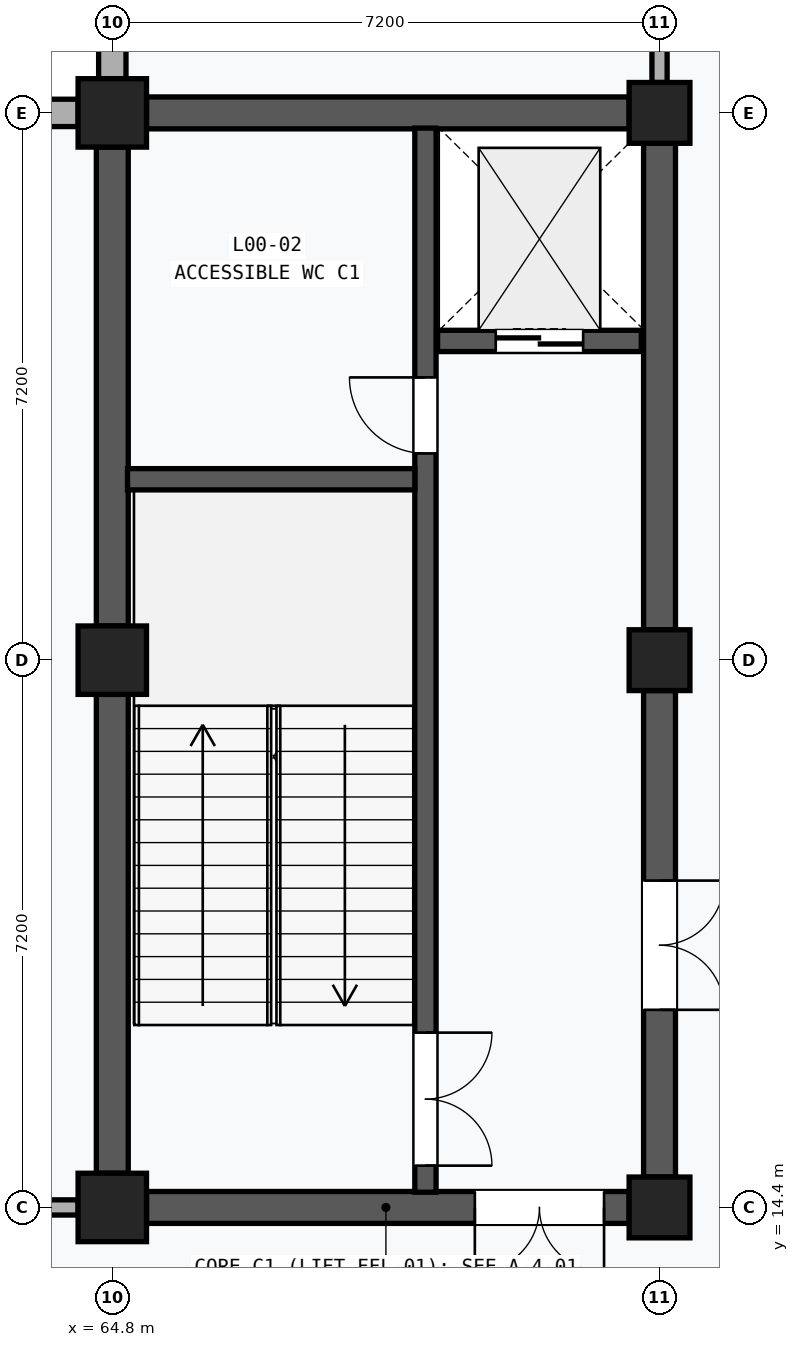
"""IFC4 building model, lengths in metres.
Left out: names, types, materials, properties, quantities, classifications, styles, units other than length and angle.
Written with IfcOpenShell. Run it as: python <this file> out.ifc"""

import sys

from ifc_helpers import new_model, si_unit, direction, frame, frame_2d, origin, origin_2d, place, context, subcontext, project, spatial, rectangle, extrude, element, fill, save


model = new_model("IFC4")
c1 = context("Model", 3, precision=1e-05, world=origin(), true_north=direction((0.0, 1.0)))
c2 = subcontext(c1, "Body", "Model", "MODEL_VIEW")
j1 = project(units=[si_unit("LENGTHUNIT", "METRE"), si_unit("PLANEANGLEUNIT", "RADIAN")], contexts=[c1])
p1 = place(None, origin())
s1 = spatial("IfcSite", under=j1, at=p1, CompositionType="ELEMENT")
p2 = place(p1, origin())
s2 = spatial("IfcBuilding", under=s1, at=p2, CompositionType="ELEMENT")
p3 = place(p2, origin())
s3 = spatial("IfcBuildingStorey", under=s2, at=p3, CompositionType="ELEMENT", Elevation=0.0)
for number, where, z_axis, x_axis in (
    (1, (64.8, 14.4, 0.0), (0.0, 0.0, 1.0), (1.0, 0.0, 0.0)),
    (2, (64.8, 21.6, 0.0), (0.0, 0.0, 1.0), (1.0, 0.0, 0.0)),
    (3, (64.8, 28.8, 0.0), (0.0, 0.0, 1.0), (1.0, 0.0, 0.0)),
):
    element("IfcColumn", number, at=place(p3, frame(where, z_axis=z_axis, x_axis=x_axis)), inside=s3, PredefinedType="COLUMN", context=c2, shape_type="SweptSolid", body=[
        extrude(rectangle(XDim=0.9, YDim=0.9, at=origin_2d()), origin(), (0.0, 0.0, 1.0), 4.8),
    ])
for number, where, z_axis, x_axis in (
    (4, (72.0, 14.4, 0.0), (0.0, 0.0, 1.0), (1.0, 0.0, 0.0)),
    (5, (72.0, 21.6, 0.0), (0.0, 0.0, 1.0), (1.0, 0.0, 0.0)),
    (6, (72.0, 28.8, 0.0), (0.0, 0.0, 1.0), (1.0, 0.0, 0.0)),
):
    element("IfcColumn", number, at=place(p3, frame(where, z_axis=z_axis, x_axis=x_axis)), inside=s3, PredefinedType="COLUMN", context=c2, shape_type="SweptSolid", body=[
        extrude(rectangle(XDim=0.8, YDim=0.8, at=origin_2d()), origin(), (0.0, 0.0, 1.0), 4.8),
    ])
p4 = place(p3, frame((58.0, 28.8, 0.0), z_axis=(0.0, 0.0, 1.0), x_axis=(1.0, 0.0, 0.0)))
e7 = element("IfcWall", 7, at=p4, inside=s3, PredefinedType="SOLIDWALL", context=c2, shape_type="SweptSolid", body=[
    extrude(rectangle(XDim=6.35, YDim=0.36, at=frame_2d((3.175, 0.0))), origin(), (0.0, 0.0, 1.0), 3.89),
])
p5 = place(p4, frame((2.375, 0.0, 1.1)))
e8 = element("IfcOpeningElement", 8, at=p5, cuts=e7, PredefinedType="OPENING", context=c2, shape_type="SweptSolid", body=[
    extrude(rectangle(XDim=1.6, YDim=1.5, at=frame_2d((0.8, 0.75))), frame((0.0, 0.192, 0.0), z_axis=(0.0, -1.0, 0.0), x_axis=(1.0, 0.0, 0.0)), (0.0, 0.0, 1.0), 0.384),
])
p6 = place(p3, frame((64.8, 29.25, 0.0), z_axis=(0.0, 0.0, 1.0), x_axis=(0.0, 1.0, 0.0)))
e9 = element("IfcWall", 9, at=p6, inside=s3, PredefinedType="SOLIDWALL", context=c2, shape_type="SweptSolid", body=[
    extrude(rectangle(XDim=6.3, YDim=0.36, at=frame_2d((3.15, 0.0))), origin(), (0.0, 0.0, 1.0), 3.89),
])
p7 = place(p6, frame((2.2, 0.0, 1.1)))
e10 = element("IfcOpeningElement", 10, at=p7, cuts=e9, PredefinedType="OPENING", context=c2, shape_type="SweptSolid", body=[
    extrude(rectangle(XDim=1.9, YDim=1.5, at=frame_2d((0.95, 0.75))), frame((0.0, 0.192, 0.0), z_axis=(0.0, -1.0, 0.0), x_axis=(1.0, 0.0, 0.0)), (0.0, 0.0, 1.0), 0.384),
])
p8 = place(p3, frame((64.8, 14.85, 0.0), z_axis=(0.0, 0.0, 1.0), x_axis=(0.0, 1.0, 0.0)))
e11 = element("IfcWall", 11, at=p8, inside=s3, PredefinedType="SHEAR", context=c2, shape_type="SweptSolid", body=[
    extrude(rectangle(XDim=6.3, YDim=0.42, at=frame_2d((3.15, 0.0))), origin(), (0.0, 0.0, 1.0), 3.62),
])
p9 = place(p3, frame((64.8, 22.05, 0.0), z_axis=(0.0, 0.0, 1.0), x_axis=(0.0, 1.0, 0.0)))
e12 = element("IfcWall", 12, at=p9, inside=s3, PredefinedType="SHEAR", context=c2, shape_type="SweptSolid", body=[
    extrude(rectangle(XDim=6.3, YDim=0.42, at=frame_2d((3.15, 0.0))), origin(), (0.0, 0.0, 1.0), 3.62),
])
p10 = place(p3, frame((72.0, 14.8, 0.0), z_axis=(0.0, 0.0, 1.0), x_axis=(0.0, 1.0, 0.0)))
e13 = element("IfcWall", 13, at=p10, inside=s3, PredefinedType="SHEAR", context=c2, shape_type="SweptSolid", body=[
    extrude(rectangle(XDim=6.4, YDim=0.42, at=frame_2d((3.2, 0.0))), origin(), (0.0, 0.0, 1.0), 3.62),
])
p11 = place(p10, frame((2.2, 0.0, 0.0)))
e14 = element("IfcOpeningElement", 14, at=p11, cuts=e13, PredefinedType="OPENING", context=c2, shape_type="SweptSolid", body=[
    extrude(rectangle(XDim=1.7, YDim=2.25, at=frame_2d((0.85, 1.125))), frame((0.0, 0.222, 0.0), z_axis=(0.0, -1.0, 0.0), x_axis=(1.0, 0.0, 0.0)), (0.0, 0.0, 1.0), 0.444),
])
p12 = place(p3, frame((72.0, 22.0, 0.0), z_axis=(0.0, 0.0, 1.0), x_axis=(0.0, 1.0, 0.0)))
e15 = element("IfcWall", 15, at=p12, inside=s3, PredefinedType="SHEAR", context=c2, shape_type="SweptSolid", body=[
    extrude(rectangle(XDim=6.4, YDim=0.42, at=frame_2d((3.2, 0.0))), origin(), (0.0, 0.0, 1.0), 3.62),
])
p13 = place(p3, frame((65.25, 14.4, 0.0), z_axis=(0.0, 0.0, 1.0), x_axis=(1.0, 0.0, 0.0)))
e16 = element("IfcWall", 16, at=p13, inside=s3, PredefinedType="SHEAR", context=c2, shape_type="SweptSolid", body=[
    extrude(rectangle(XDim=6.35, YDim=0.42, at=frame_2d((3.175, 0.0))), origin(), (0.0, 0.0, 1.0), 3.62),
])
p14 = place(p13, frame((4.32, 0.0, 0.0)))
e17 = element("IfcOpeningElement", 17, at=p14, cuts=e16, PredefinedType="OPENING", context=c2, shape_type="SweptSolid", body=[
    extrude(rectangle(XDim=1.7, YDim=2.25, at=frame_2d((0.85, 1.125))), frame((0.0, 0.222, 0.0), z_axis=(0.0, -1.0, 0.0), x_axis=(1.0, 0.0, 0.0)), (0.0, 0.0, 1.0), 0.444),
])
p15 = place(p3, frame((65.25, 28.8, 0.0), z_axis=(0.0, 0.0, 1.0), x_axis=(1.0, 0.0, 0.0)))
e18 = element("IfcWall", 18, at=p15, inside=s3, PredefinedType="SHEAR", context=c2, shape_type="SweptSolid", body=[
    extrude(rectangle(XDim=6.35, YDim=0.42, at=frame_2d((3.175, 0.0))), origin(), (0.0, 0.0, 1.0), 3.62),
])
p16 = place(p3, frame((68.92, 14.6, 0.0), z_axis=(0.0, 0.0, 1.0), x_axis=(0.0, 1.0, 0.0)))
e19 = element("IfcWall", 19, at=p16, inside=s3, PredefinedType="SHEAR", context=c2, shape_type="SweptSolid", body=[
    extrude(rectangle(XDim=14.0, YDim=0.28, at=frame_2d((7.0, 0.0))), origin(), (0.0, 0.0, 1.0), 4.52),
])
p17 = place(p16, frame((0.35, 0.0, 0.0)))
e20 = element("IfcOpeningElement", 20, at=p17, cuts=e19, PredefinedType="OPENING", context=c2, shape_type="SweptSolid", body=[
    extrude(rectangle(XDim=1.75, YDim=2.15, at=frame_2d((0.875, 1.075))), frame((0.0, 0.152, 0.0), z_axis=(0.0, -1.0, 0.0), x_axis=(1.0, 0.0, 0.0)), (0.0, 0.0, 1.0), 0.304),
])
p18 = place(p16, frame((9.72, 0.0, 0.0)))
e21 = element("IfcOpeningElement", 21, at=p18, cuts=e19, PredefinedType="OPENING", context=c2, shape_type="SweptSolid", body=[
    extrude(rectangle(XDim=1.0, YDim=2.15, at=frame_2d((0.5, 1.075))), frame((0.0, 0.152, 0.0), z_axis=(0.0, -1.0, 0.0), x_axis=(1.0, 0.0, 0.0)), (0.0, 0.0, 1.0), 0.304),
])
p19 = place(p3, frame((65.0, 23.98, 0.0), z_axis=(0.0, 0.0, 1.0), x_axis=(1.0, 0.0, 0.0)))
e22 = element("IfcWall", 22, at=p19, inside=s3, PredefinedType="SHEAR", context=c2, shape_type="SweptSolid", body=[
    extrude(rectangle(XDim=3.78, YDim=0.28, at=frame_2d((1.89, 0.0))), origin(), (0.0, 0.0, 1.0), 4.52),
])
p20 = place(p3, frame((69.08, 25.8, 0.0), z_axis=(0.0, 0.0, 1.0), x_axis=(1.0, 0.0, 0.0)))
e23 = element("IfcWall", 23, at=p20, inside=s3, PredefinedType="SHEAR", context=c2, shape_type="SweptSolid", body=[
    extrude(rectangle(XDim=2.68, YDim=0.28, at=frame_2d((1.34, 0.0))), origin(), (0.0, 0.0, 1.0), 4.52),
])
p21 = place(p20, frame((0.765, 0.0, 0.0)))
e24 = element("IfcOpeningElement", 24, at=p21, cuts=e23, PredefinedType="OPENING", context=c2, shape_type="SweptSolid", body=[
    extrude(rectangle(XDim=1.15, YDim=2.2, at=frame_2d((0.575, 1.1))), frame((0.0, 0.152, 0.0), z_axis=(0.0, -1.0, 0.0), x_axis=(1.0, 0.0, 0.0)), (0.0, 0.0, 1.0), 0.304),
])
p22 = place(p3, frame((58.0, 14.4, 0.0), z_axis=(0.0, 0.0, 1.0), x_axis=(1.0, 0.0, 0.0)))
e25 = element("IfcWall", 25, at=p22, inside=s3, PredefinedType="PARTITIONING", context=c2, shape_type="SweptSolid", body=[
    extrude(rectangle(XDim=6.35, YDim=0.2, at=frame_2d((3.175, 0.0))), origin(), (0.0, 0.0, 1.0), 3.62),
])
p23 = place(p22, frame((2.675, 0.0, 0.0)))
e26 = element("IfcOpeningElement", 26, at=p23, cuts=e25, PredefinedType="OPENING", context=c2, shape_type="SweptSolid", body=[
    extrude(rectangle(XDim=1.0, YDim=2.1, at=frame_2d((0.5, 1.05))), frame((0.0, 0.112, 0.0), z_axis=(0.0, -1.0, 0.0), x_axis=(1.0, 0.0, 0.0)), (0.0, 0.0, 1.0), 0.224),
])
p24 = place(p3, frame((72.0, 29.2, 0.0), z_axis=(0.0, 0.0, 1.0), x_axis=(0.0, 1.0, 0.0)))
e27 = element("IfcWall", 27, at=p24, inside=s3, PredefinedType="PARTITIONING", context=c2, shape_type="SweptSolid", body=[
    extrude(rectangle(XDim=6.4, YDim=0.2, at=frame_2d((3.2, 0.0))), origin(), (0.0, 0.0, 1.0), 3.62),
])
p25 = place(p24, frame((2.69, 0.0, 0.0)))
e28 = element("IfcOpeningElement", 28, at=p25, cuts=e27, PredefinedType="OPENING", context=c2, shape_type="SweptSolid", body=[
    extrude(rectangle(XDim=1.02, YDim=2.12, at=frame_2d((0.51, 1.06))), frame((0.0, 0.112, 0.0), z_axis=(0.0, -1.0, 0.0), x_axis=(1.0, 0.0, 0.0)), (0.0, 0.0, 1.0), 0.224),
])
p26 = place(p11, frame((1.7, 0.0, 0.0), z_axis=(0.0, 0.0, 1.0), x_axis=(-1.0, 0.0, 0.0)))
e29 = element("IfcDoor", 29, at=p26, inside=s3, OperationType="DOUBLE_DOOR_SINGLE_SWING", PredefinedType="DOOR", context=c2, shape_type="SweptSolid", body=[
    extrude(rectangle(XDim=1.7, YDim=2.25, at=frame_2d((0.85, 1.125))), frame((0.0, 0.025, 0.0), z_axis=(0.0, -1.0, 0.0), x_axis=(1.0, 0.0, 0.0)), (0.0, 0.0, 1.0), 0.05),
])
fill(e14, e29)
p27 = place(p14, frame((1.7, 0.0, 0.0), z_axis=(0.0, 0.0, 1.0), x_axis=(-1.0, 0.0, 0.0)))
e30 = element("IfcDoor", 30, at=p27, inside=s3, OperationType="DOUBLE_DOOR_SINGLE_SWING", PredefinedType="DOOR", context=c2, shape_type="SweptSolid", body=[
    extrude(rectangle(XDim=1.7, YDim=2.25, at=frame_2d((0.85, 1.125))), frame((0.0, 0.025, 0.0), z_axis=(0.0, -1.0, 0.0), x_axis=(1.0, 0.0, 0.0)), (0.0, 0.0, 1.0), 0.05),
])
fill(e17, e30)
p28 = place(p17, frame((1.75, 0.0, 0.0), z_axis=(0.0, 0.0, 1.0), x_axis=(-1.0, 0.0, 0.0)))
e31 = element("IfcDoor", 31, at=p28, inside=s3, OperationType="DOUBLE_DOOR_SINGLE_SWING", PredefinedType="DOOR", context=c2, shape_type="SweptSolid", body=[
    extrude(rectangle(XDim=1.75, YDim=2.15, at=frame_2d((0.875, 1.075))), frame((0.0, 0.025, 0.0), z_axis=(0.0, -1.0, 0.0), x_axis=(1.0, 0.0, 0.0)), (0.0, 0.0, 1.0), 0.05),
])
fill(e20, e31)
p29 = place(p18, origin())
e32 = element("IfcDoor", 32, at=p29, inside=s3, OperationType="SINGLE_SWING_RIGHT", PredefinedType="DOOR", context=c2, shape_type="SweptSolid", body=[
    extrude(rectangle(XDim=1.0, YDim=2.15, at=frame_2d((0.5, 1.075))), frame((0.0, 0.025, 0.0), z_axis=(0.0, -1.0, 0.0), x_axis=(1.0, 0.0, 0.0)), (0.0, 0.0, 1.0), 0.05),
])
fill(e21, e32)
p30 = place(p21, frame((1.15, 0.0, 0.0), z_axis=(0.0, 0.0, 1.0), x_axis=(-1.0, 0.0, 0.0)))
e33 = element("IfcDoor", 33, at=p30, inside=s3, OperationType="DOUBLE_DOOR_SLIDING", PredefinedType="DOOR", context=c2, shape_type="SweptSolid", body=[
    extrude(rectangle(XDim=1.15, YDim=2.2, at=frame_2d((0.575, 1.1))), frame((0.0, 0.025, 0.0), z_axis=(0.0, -1.0, 0.0), x_axis=(1.0, 0.0, 0.0)), (0.0, 0.0, 1.0), 0.05),
])
fill(e24, e33)
save(model, sys.argv[1])
